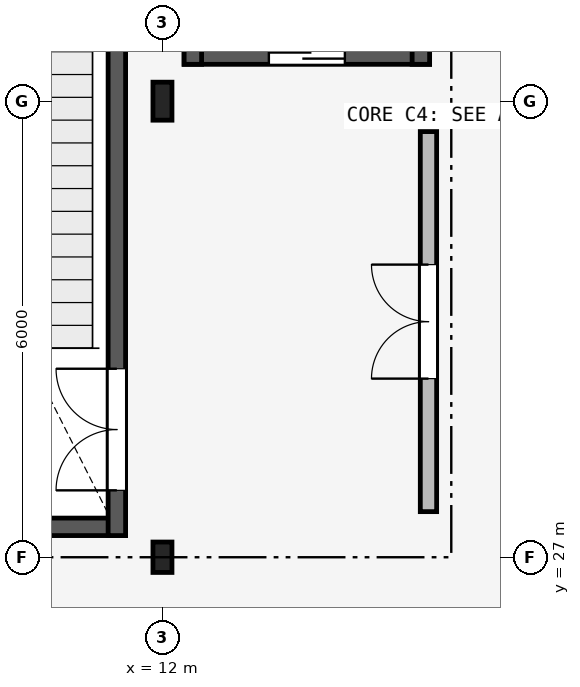
"""IFC4 building model, lengths in metres.
Left out: names, types, materials, properties, quantities, classifications, styles, units other than length and angle.
Written with IfcOpenShell. Run it as: python <this file> out.ifc"""

import sys

from ifc_helpers import new_model, si_unit, direction, frame, frame_2d, origin, origin_2d, place, context, subcontext, project, spatial, rectangle, i_section, extrude, element, fill, save


model = new_model("IFC4")
c1 = context("Model", 3, precision=1e-05, world=origin(), true_north=direction((0.0, 1.0)))
c2 = subcontext(c1, "Body", "Model", "MODEL_VIEW")
j1 = project(units=[si_unit("LENGTHUNIT", "METRE"), si_unit("PLANEANGLEUNIT", "RADIAN")], contexts=[c1])
p1 = place(None, origin())
s1 = spatial("IfcSite", under=j1, at=p1, CompositionType="ELEMENT")
p2 = place(p1, origin())
s2 = spatial("IfcBuilding", under=s1, at=p2, CompositionType="ELEMENT")
p3 = place(p2, frame((0.0, 0.0, 18.0)))
s3 = spatial("IfcBuildingStorey", under=s2, at=p3, CompositionType="ELEMENT", Elevation=18.0)
p4 = place(p3, frame((12.0, 27.0, 0.0), z_axis=(0.0, 0.0, 1.0), x_axis=(1.0, 0.0, 0.0)))
e1 = element("IfcColumn", 1, at=p4, inside=s3, PredefinedType="COLUMN", context=c2, shape_type="SweptSolid", body=[
    extrude(i_section(OverallWidth=0.25, OverallDepth=0.4, WebThickness=0.01, FlangeThickness=0.013, FilletRadius=0.014, at=origin_2d()), origin(), (0.0, 0.0, 1.0), 4.2),
])
p5 = place(p3, frame((12.0, 33.0, 0.0), z_axis=(0.0, 0.0, 1.0), x_axis=(1.0, 0.0, 0.0)))
e2 = element("IfcColumn", 2, at=p5, inside=s3, PredefinedType="COLUMN", context=c2, shape_type="SweptSolid", body=[
    extrude(i_section(OverallWidth=0.25, OverallDepth=0.5, WebThickness=0.01, FlangeThickness=0.015, FilletRadius=0.015, at=origin_2d()), origin(), (0.0, 0.0, 1.0), 4.2),
])
p6 = place(p3, frame((6.485, 27.4, 0.0), z_axis=(0.0, 0.0, 1.0), x_axis=(1.0, 0.0, 0.0)))
e3 = element("IfcWall", 3, at=p6, inside=s3, PredefinedType="SHEAR", context=c2, shape_type="SweptSolid", body=[
    extrude(rectangle(XDim=5.03, YDim=0.23, at=frame_2d((2.515, 0.0))), origin(), (0.0, 0.0, 1.0), 4.06),
])
p7 = place(p3, frame((11.4, 27.285, 0.0), z_axis=(0.0, 0.0, 1.0), x_axis=(0.0, 1.0, 0.0)))
e4 = element("IfcWall", 4, at=p7, inside=s3, PredefinedType="SHEAR", context=c2, shape_type="SweptSolid", body=[
    extrude(rectangle(XDim=9.63, YDim=0.23, at=frame_2d((4.815, 0.0))), origin(), (0.0, 0.0, 1.0), 4.06),
])
p8 = place(p7, frame((0.595, 0.0, 0.0)))
e5 = element("IfcOpeningElement", 5, at=p8, cuts=e4, PredefinedType="OPENING", context=c2, shape_type="SweptSolid", body=[
    extrude(rectangle(XDim=1.6, YDim=2.2, at=frame_2d((0.8, 1.1))), frame((0.0, 0.125, 0.0), z_axis=(0.0, -1.0, 0.0), x_axis=(1.0, 0.0, 0.0)), (0.0, 0.0, 1.0), 0.25),
])
p9 = place(p3, frame((15.5, 27.6, 0.0), z_axis=(0.0, 0.0, 1.0), x_axis=(0.0, 1.0, 0.0)))
e6 = element("IfcWall", 6, at=p9, inside=s3, PredefinedType="PARTITIONING", context=c2, shape_type="SweptSolid", body=[
    extrude(rectangle(XDim=5.0, YDim=0.215, at=frame_2d((2.5, 0.0))), origin(), (0.0, 0.0, 1.0), 3.89),
])
p10 = place(p9, frame((1.75, 0.0, 0.0)))
e7 = element("IfcOpeningElement", 7, at=p10, cuts=e6, PredefinedType="OPENING", context=c2, shape_type="SweptSolid", body=[
    extrude(rectangle(XDim=1.5, YDim=2.15, at=frame_2d((0.75, 1.075))), frame((0.0, 0.117, 0.0), z_axis=(0.0, -1.0, 0.0), x_axis=(1.0, 0.0, 0.0)), (0.0, 0.0, 1.0), 0.235),
])
p11 = place(p3, frame((12.285, 33.6, 0.0), z_axis=(0.0, 0.0, 1.0), x_axis=(1.0, 0.0, 0.0)))
e8 = element("IfcWall", 8, at=p11, inside=s3, PredefinedType="SHEAR", context=c2, shape_type="SweptSolid", body=[
    extrude(rectangle(XDim=3.23, YDim=0.23, at=frame_2d((1.615, 0.0))), origin(), (0.0, 0.0, 1.0), 4.2),
])
p12 = place(p11, frame((1.115, 0.0, 0.0)))
e9 = element("IfcOpeningElement", 9, at=p12, cuts=e8, PredefinedType="OPENING", context=c2, shape_type="SweptSolid", body=[
    extrude(rectangle(XDim=1.0, YDim=2.15, at=frame_2d((0.5, 1.075))), frame((0.0, 0.125, 0.0), z_axis=(0.0, -1.0, 0.0), x_axis=(1.0, 0.0, 0.0)), (0.0, 0.0, 1.0), 0.25),
])
for number, where, z_axis, x_axis in (
    (10, (15.4, 33.485, 0.0), (0.0, 0.0, 1.0), (0.0, 1.0, 0.0)),
    (11, (12.4, 37.115, 0.0), (0.0, 0.0, 1.0), (0.0, -1.0, 0.0)),
):
    element("IfcWall", number, at=place(p3, frame(where, z_axis=z_axis, x_axis=x_axis)), inside=s3, PredefinedType="SHEAR", context=c2, shape_type="SweptSolid", body=[
        extrude(rectangle(XDim=3.63, YDim=0.23, at=frame_2d((1.815, 0.0))), origin(), (0.0, 0.0, 1.0), 4.2),
    ])
p13 = place(p8, origin())
e12 = element("IfcDoor", 12, at=p13, inside=s3, OperationType="DOUBLE_DOOR_SINGLE_SWING", PredefinedType="DOOR", context=c2, shape_type="SweptSolid", body=[
    extrude(rectangle(XDim=1.6, YDim=2.2, at=frame_2d((0.8, 1.1))), frame((0.0, 0.025, 0.0), z_axis=(0.0, -1.0, 0.0), x_axis=(1.0, 0.0, 0.0)), (0.0, 0.0, 1.0), 0.05),
])
fill(e5, e12)
p14 = place(p10, origin())
e13 = element("IfcDoor", 13, at=p14, inside=s3, OperationType="DOUBLE_DOOR_SINGLE_SWING", PredefinedType="DOOR", context=c2, shape_type="SweptSolid", body=[
    extrude(rectangle(XDim=1.5, YDim=2.15, at=frame_2d((0.75, 1.075))), frame((0.0, 0.025, 0.0), z_axis=(0.0, -1.0, 0.0), x_axis=(1.0, 0.0, 0.0)), (0.0, 0.0, 1.0), 0.05),
])
fill(e7, e13)
p15 = place(p12, origin())
e14 = element("IfcDoor", 14, at=p15, inside=s3, OperationType="SLIDING_TO_LEFT", PredefinedType="DOOR", context=c2, shape_type="SweptSolid", body=[
    extrude(rectangle(XDim=1.0, YDim=2.15, at=frame_2d((0.5, 1.075))), frame((0.0, 0.025, 0.0), z_axis=(0.0, -1.0, 0.0), x_axis=(1.0, 0.0, 0.0)), (0.0, 0.0, 1.0), 0.05),
])
fill(e9, e14)
save(model, sys.argv[1])
